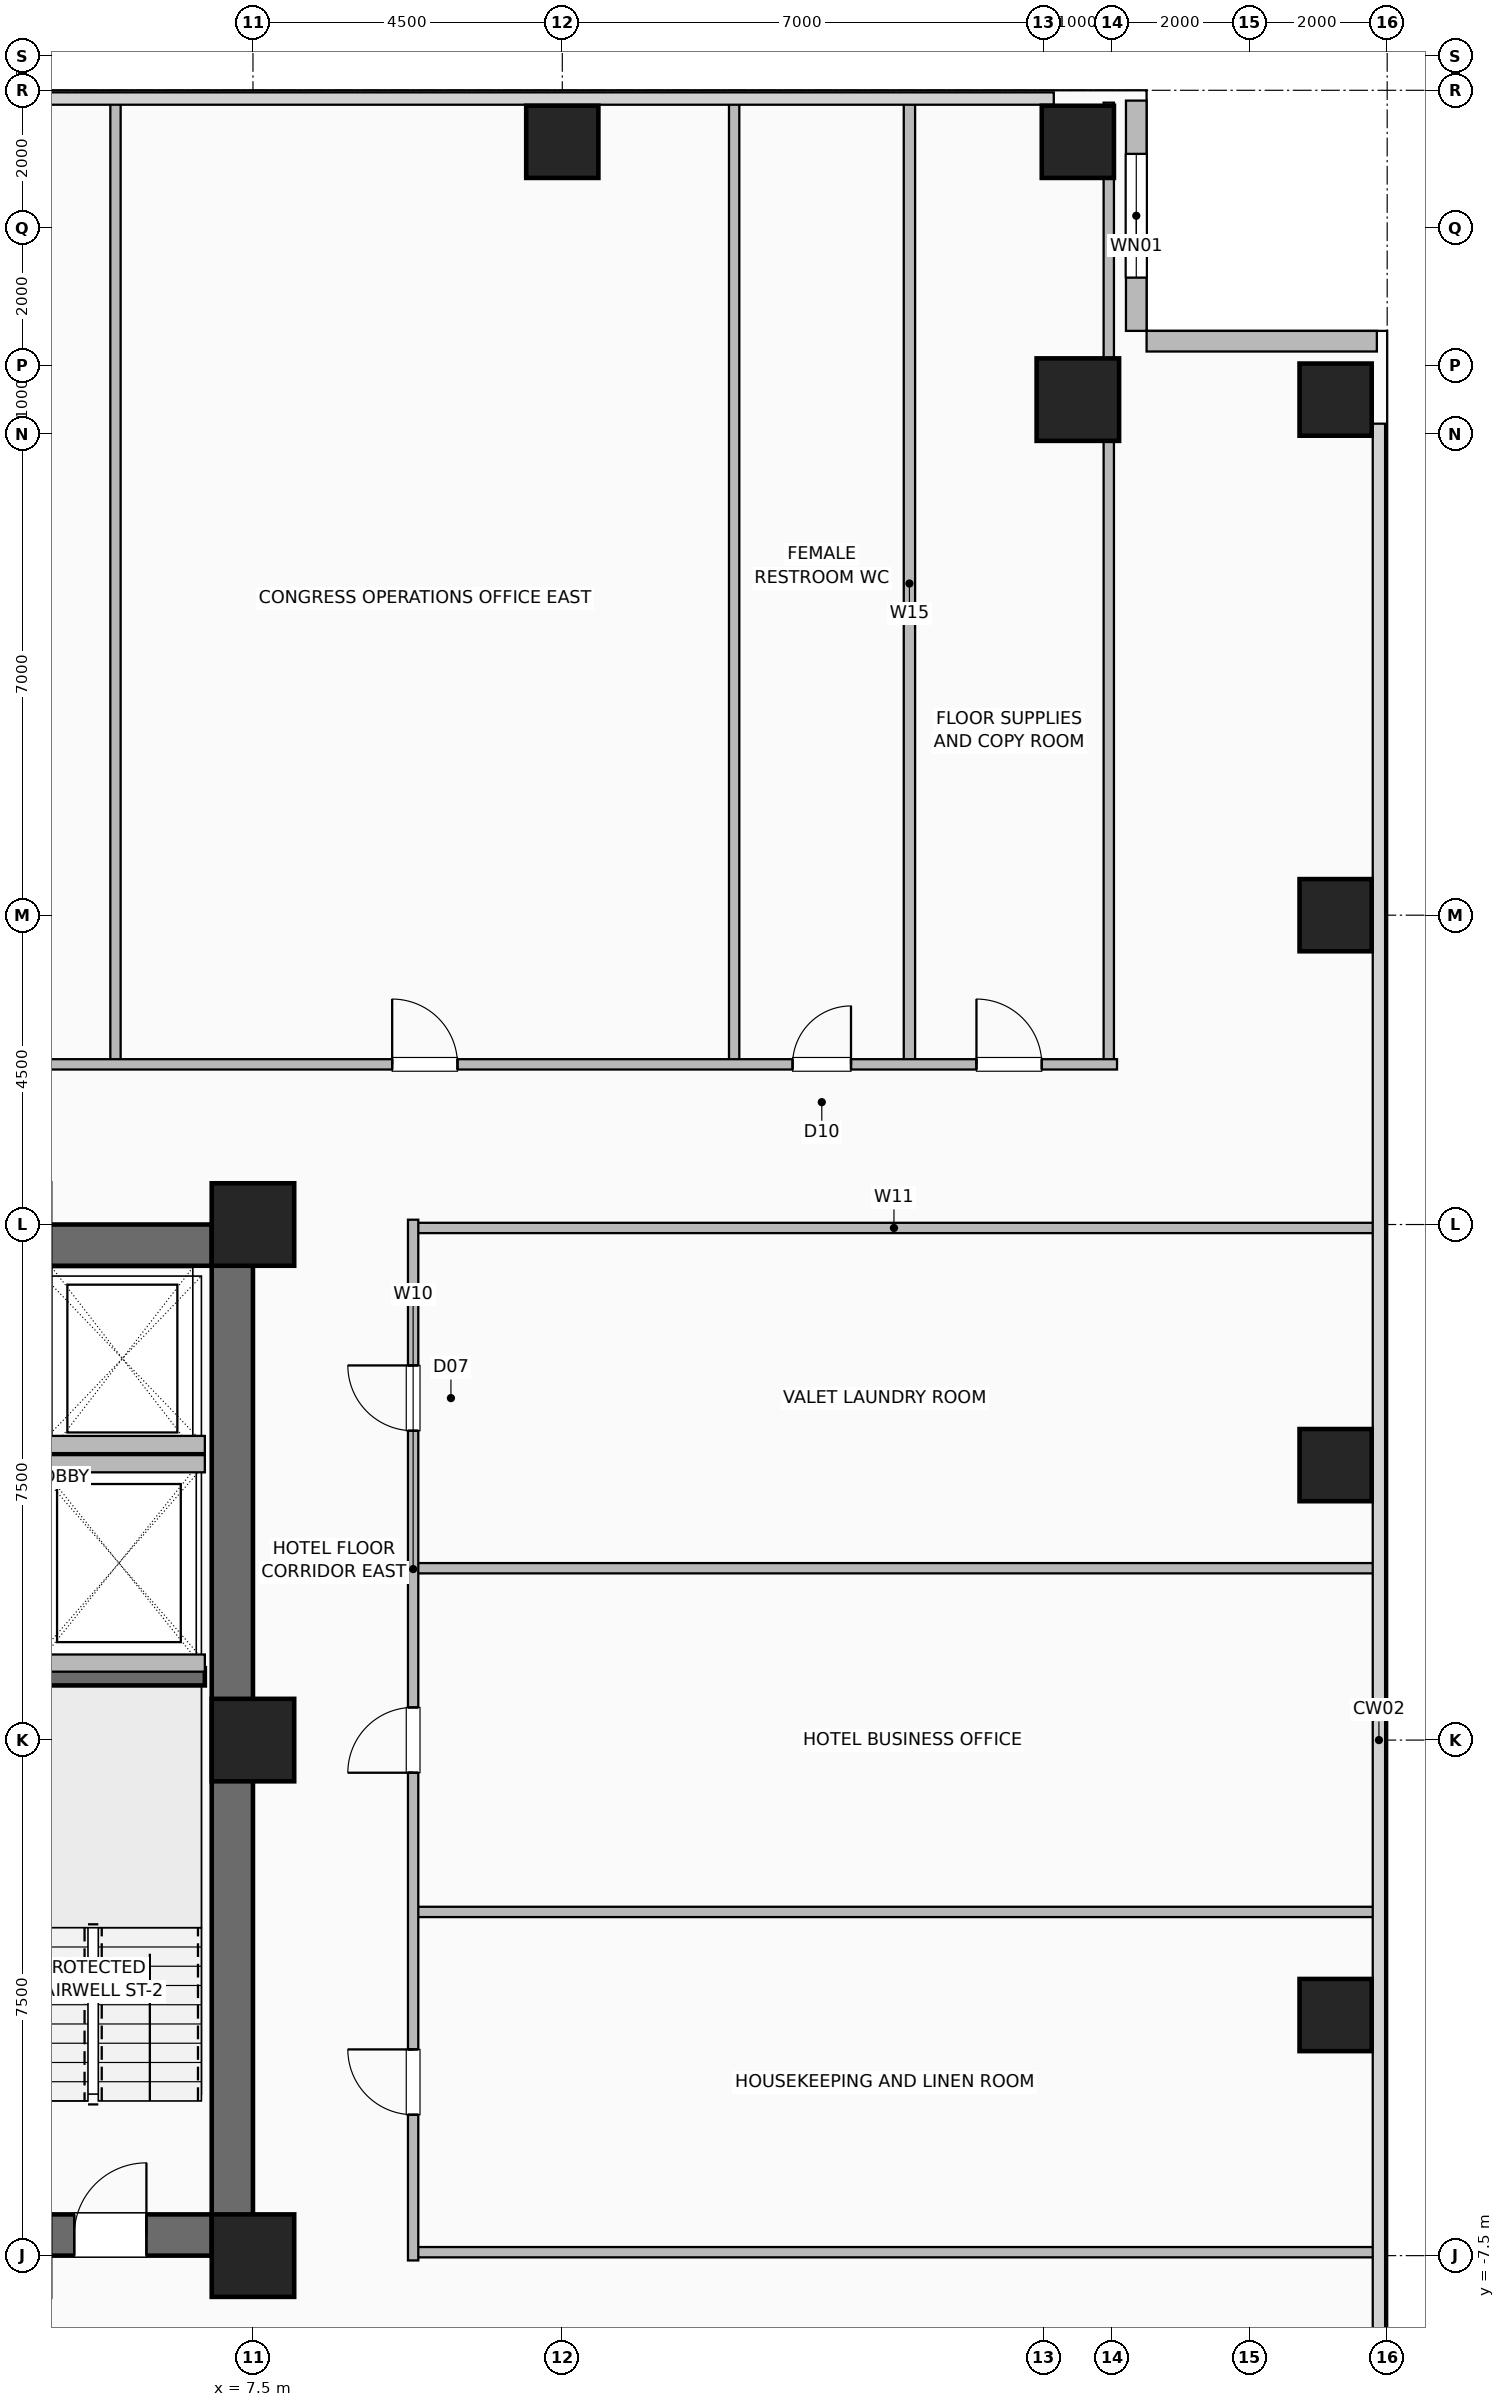
"""IFC4 building model, lengths in metres.
Left out: names, types, materials, properties, quantities, classifications, styles, units other than length and angle.
Written with IfcOpenShell. Run it as: python <this file> out.ifc"""

import sys

from ifc_helpers import new_model, si_unit, direction, frame, frame_2d, origin, origin_2d, place, context, subcontext, project, spatial, rectangle, hollow_rectangle, extrude, element, fill, save


model = new_model("IFC4")
c1 = context("Model", 3, precision=1e-05, world=origin(), true_north=direction((0.0, 1.0)))
c2 = subcontext(c1, "Body", "Model", "MODEL_VIEW")
j1 = project(units=[si_unit("LENGTHUNIT", "METRE"), si_unit("PLANEANGLEUNIT", "RADIAN")], contexts=[c1])
p1 = place(None, origin())
s1 = spatial("IfcSite", under=j1, at=p1, CompositionType="ELEMENT")
p2 = place(p1, origin())
s2 = spatial("IfcBuilding", under=s1, at=p2, CompositionType="ELEMENT")
p3 = place(p2, frame((0.0, 0.0, 41.0)))
s3 = spatial("IfcBuildingStorey", under=s2, at=p3, CompositionType="ELEMENT", Elevation=41.0)
for number, where, z_axis, x_axis in (
    (1, (7.5, -7.5, 0.0), (0.0, 0.0, 1.0), (1.0, 0.0, 0.0)),
    (2, (7.5, 0.0, 0.0), (0.0, 0.0, 1.0), (1.0, 0.0, 0.0)),
    (3, (7.5, 7.5, 0.0), (0.0, 0.0, 1.0), (1.0, 0.0, 0.0)),
):
    element("IfcColumn", number, at=place(p3, frame(where, z_axis=z_axis, x_axis=x_axis)), inside=s3, PredefinedType="COLUMN", context=c2, shape_type="SweptSolid", body=[
        extrude(hollow_rectangle(XDim=1.2, YDim=1.2, WallThickness=0.055, at=origin_2d()), origin(), (0.0, 0.0, 1.0), 3.5),
    ])
for number, where, z_axis, x_axis in (
    (4, (23.25, -4.0, 0.0), (0.0, 0.0, 1.0), (1.0, 0.0, 0.0)),
    (5, (23.25, 4.0, 0.0), (0.0, 0.0, 1.0), (1.0, 0.0, 0.0)),
    (6, (12.0, 23.25, 0.0), (0.0, 0.0, 1.0), (1.0, 0.0, 0.0)),
    (7, (23.25, 12.0, 0.0), (0.0, 0.0, 1.0), (1.0, 0.0, 0.0)),
    (8, (19.5, 23.25, 0.0), (0.0, 0.0, 1.0), (1.0, 0.0, 0.0)),
    (9, (23.25, 19.5, 0.0), (0.0, 0.0, 1.0), (1.0, 0.0, 0.0)),
):
    element("IfcColumn", number, at=place(p3, frame(where, z_axis=z_axis, x_axis=x_axis)), inside=s3, PredefinedType="COLUMN", context=c2, shape_type="SweptSolid", body=[
        extrude(hollow_rectangle(XDim=1.05, YDim=1.05, WallThickness=0.05, at=origin_2d()), origin(), (0.0, 0.0, 1.0), 3.5),
    ])
p4 = place(p3, frame((19.5, 19.5, 0.0), z_axis=(0.0, 0.0, 1.0), x_axis=(1.0, 0.0, 0.0)))
e10 = element("IfcColumn", 10, at=p4, inside=s3, PredefinedType="COLUMN", context=c2, shape_type="SweptSolid", body=[
    extrude(hollow_rectangle(XDim=1.2, YDim=1.2, WallThickness=0.055, at=origin_2d()), origin(), (0.0, 0.0, 1.0), 3.5),
])
p5 = place(p3, frame((20.35, 23.85, 0.0), z_axis=(0.0, 0.0, 1.0), x_axis=(0.0, -1.0, 0.0)))
e11 = element("IfcWall", 11, at=p5, inside=s3, PredefinedType="SOLIDWALL", context=c2, shape_type="SweptSolid", body=[
    extrude(rectangle(XDim=3.35, YDim=0.3, at=frame_2d((1.675, 0.0))), origin(), (0.0, 0.0, 1.0), 3.25),
])
p6 = place(p5, frame((0.775, 0.0, 0.9)))
e12 = element("IfcOpeningElement", 12, at=p6, cuts=e11, PredefinedType="OPENING", context=c2, shape_type="SweptSolid", body=[
    extrude(rectangle(XDim=1.8, YDim=1.8, at=frame_2d((0.9, 0.9))), frame((0.0, 0.16, 0.0), z_axis=(0.0, -1.0, 0.0), x_axis=(1.0, 0.0, 0.0)), (0.0, 0.0, 1.0), 0.32),
])
p7 = place(p3, frame((23.85, 20.35, 0.0), z_axis=(0.0, 0.0, 1.0), x_axis=(-1.0, 0.0, 0.0)))
e13 = element("IfcWall", 13, at=p7, inside=s3, PredefinedType="SOLIDWALL", context=c2, shape_type="SweptSolid", body=[
    extrude(rectangle(XDim=3.35, YDim=0.3, at=frame_2d((1.675, 0.0))), origin(), (0.0, 0.0, 1.0), 3.25),
])
p8 = place(p3, frame((-7.5, -7.2, 0.0), z_axis=(0.0, 0.0, 1.0), x_axis=(1.0, 0.0, 0.0)))
e14 = element("IfcWall", 14, at=p8, inside=s3, PredefinedType="SHEAR", context=c2, shape_type="SweptSolid", body=[
    extrude(rectangle(XDim=15.0, YDim=0.6, at=frame_2d((7.5, 0.0))), origin(), (0.0, 0.0, 1.0), 3.25),
])
p9 = place(p8, frame((1.55, 0.0, 0.0)))
e15 = element("IfcOpeningElement", 15, at=p9, cuts=e14, PredefinedType="OPENING", context=c2, shape_type="SweptSolid", body=[
    extrude(rectangle(XDim=1.05, YDim=2.08, at=frame_2d((0.525, 1.04))), frame((0.0, 0.31, 0.0), z_axis=(0.0, -1.0, 0.0), x_axis=(1.0, 0.0, 0.0)), (0.0, 0.0, 1.0), 0.62),
])
p10 = place(p8, frame((12.4, 0.0, 0.0)))
e16 = element("IfcOpeningElement", 16, at=p10, cuts=e14, PredefinedType="OPENING", context=c2, shape_type="SweptSolid", body=[
    extrude(rectangle(XDim=1.05, YDim=2.08, at=frame_2d((0.525, 1.04))), frame((0.0, 0.31, 0.0), z_axis=(0.0, -1.0, 0.0), x_axis=(1.0, 0.0, 0.0)), (0.0, 0.0, 1.0), 0.62),
])
p11 = place(p8, frame((4.64, 0.0, 0.0)))
e17 = element("IfcOpeningElement", 17, at=p11, cuts=e14, PredefinedType="OPENING", context=c2, shape_type="SweptSolid", body=[
    extrude(rectangle(XDim=1.1, YDim=2.2, at=frame_2d((0.55, 1.1))), frame((0.0, 0.31, 0.0), z_axis=(0.0, -1.0, 0.0), x_axis=(1.0, 0.0, 0.0)), (0.0, 0.0, 1.0), 0.62),
])
p12 = place(p8, frame((6.52, 0.0, 0.0)))
e18 = element("IfcOpeningElement", 18, at=p12, cuts=e14, PredefinedType="OPENING", context=c2, shape_type="SweptSolid", body=[
    extrude(rectangle(XDim=1.1, YDim=2.2, at=frame_2d((0.55, 1.1))), frame((0.0, 0.31, 0.0), z_axis=(0.0, -1.0, 0.0), x_axis=(1.0, 0.0, 0.0)), (0.0, 0.0, 1.0), 0.62),
])
p13 = place(p8, frame((8.4, 0.0, 0.0)))
e19 = element("IfcOpeningElement", 19, at=p13, cuts=e14, PredefinedType="OPENING", context=c2, shape_type="SweptSolid", body=[
    extrude(rectangle(XDim=1.1, YDim=2.2, at=frame_2d((0.55, 1.1))), frame((0.0, 0.31, 0.0), z_axis=(0.0, -1.0, 0.0), x_axis=(1.0, 0.0, 0.0)), (0.0, 0.0, 1.0), 0.62),
])
for number, where, z_axis, x_axis in (
    (20, (-7.5, 7.2, 0.0), (0.0, 0.0, 1.0), (1.0, 0.0, 0.0)),
    (21, (7.2, -7.5, 0.0), (0.0, 0.0, 1.0), (0.0, 1.0, 0.0)),
):
    element("IfcWall", number, at=place(p3, frame(where, z_axis=z_axis, x_axis=x_axis)), inside=s3, PredefinedType="SHEAR", context=c2, shape_type="SweptSolid", body=[
        extrude(rectangle(XDim=15.0, YDim=0.6, at=frame_2d((7.5, 0.0))), origin(), (0.0, 0.0, 1.0), 3.25),
    ])
p14 = place(p3, frame((3.47, 0.92, 0.0), z_axis=(0.0, 0.0, 1.0), x_axis=(1.0, 0.0, 0.0)))
e22 = element("IfcWall", 22, at=p14, inside=s3, PredefinedType="SHEAR", context=c2, shape_type="SweptSolid", body=[
    extrude(rectangle(XDim=3.33, YDim=0.25, at=frame_2d((1.665, 0.0))), origin(), (0.0, 0.0, 1.0), 3.25),
])
p15 = place(p3, frame((4.38, 4.3, 0.0), z_axis=(0.0, 0.0, 1.0), x_axis=(1.0, 0.0, 0.0)))
e23 = element("IfcWall", 23, at=p15, inside=s3, PredefinedType="SHEAR", context=c2, shape_type="SweptSolid", body=[
    extrude(rectangle(XDim=2.42, YDim=0.25, at=frame_2d((1.21, 0.0))), origin(), (0.0, 0.0, 1.0), 3.25),
])
for number, where, z_axis, x_axis in (
    (24, (4.28, 1.12, 0.0), (0.0, 0.0, 1.0), (1.0, 0.0, 0.0)),
    (25, (4.28, 4.02, 0.0), (0.0, 0.0, 1.0), (1.0, 0.0, 0.0)),
):
    element("IfcWall", number, at=place(p3, frame(where, z_axis=z_axis, x_axis=x_axis)), inside=s3, PredefinedType="SHEAR", context=c2, shape_type="SweptSolid", body=[
        extrude(rectangle(XDim=2.52, YDim=0.25, at=frame_2d((1.26, 0.0))), origin(), (0.0, 0.0, 1.0), 3.25),
    ])
p16 = place(p3, frame((17.05, 9.83, 0.0), z_axis=(0.0, 0.0, 1.0), x_axis=(0.0, 1.0, 0.0)))
e26 = element("IfcWall", 26, at=p16, inside=s3, PredefinedType="PLUMBINGWALL", context=c2, shape_type="SweptSolid", body=[
    extrude(rectangle(XDim=13.99, YDim=0.165, at=frame_2d((6.995, 0.0))), origin(), (0.0, 0.0, 1.0), 3.25),
])
for number, where, z_axis, x_axis in (
    (27, (5.5, 9.83, 0.0), (0.0, 0.0, 1.0), (0.0, 1.0, 0.0)),
    (28, (14.5, 9.83, 0.0), (0.0, 0.0, 1.0), (0.0, 1.0, 0.0)),
    (29, (19.95, 9.83, 0.0), (0.0, 0.0, 1.0), (0.0, 1.0, 0.0)),
):
    element("IfcWall", number, at=place(p3, frame(where, z_axis=z_axis, x_axis=x_axis)), inside=s3, PredefinedType="PARTITIONING", context=c2, shape_type="SweptSolid", body=[
        extrude(rectangle(XDim=13.99, YDim=0.15, at=frame_2d((6.995, 0.0))), origin(), (0.0, 0.0, 1.0), 3.25),
    ])
p17 = place(p3, frame((-20.07, 9.83, 0.0), z_axis=(0.0, 0.0, 1.0), x_axis=(1.0, 0.0, 0.0)))
e30 = element("IfcWall", 30, at=p17, inside=s3, PredefinedType="PARTITIONING", context=c2, shape_type="SweptSolid", body=[
    extrude(rectangle(XDim=40.14, YDim=0.15, at=frame_2d((20.07, 0.0))), origin(), (0.0, 0.0, 1.0), 3.25),
])
p18 = place(p17, frame((6.62, 0.0, 0.0)))
e31 = element("IfcOpeningElement", 31, at=p18, cuts=e30, PredefinedType="OPENING", context=c2, shape_type="SweptSolid", body=[
    extrude(rectangle(XDim=0.95, YDim=2.06, at=frame_2d((0.475, 1.03))), frame((0.0, 0.085, 0.0), z_axis=(0.0, -1.0, 0.0), x_axis=(1.0, 0.0, 0.0)), (0.0, 0.0, 1.0), 0.17),
])
p19 = place(p17, frame((18.92, 0.0, 0.0)))
e32 = element("IfcOpeningElement", 32, at=p19, cuts=e30, PredefinedType="OPENING", context=c2, shape_type="SweptSolid", body=[
    extrude(rectangle(XDim=1.8, YDim=2.08, at=frame_2d((0.9, 1.04))), frame((0.0, 0.085, 0.0), z_axis=(0.0, -1.0, 0.0), x_axis=(1.0, 0.0, 0.0)), (0.0, 0.0, 1.0), 0.17),
])
p20 = place(p17, frame((29.595, 0.0, 0.0)))
e33 = element("IfcOpeningElement", 33, at=p20, cuts=e30, PredefinedType="OPENING", context=c2, shape_type="SweptSolid", body=[
    extrude(rectangle(XDim=0.95, YDim=2.06, at=frame_2d((0.475, 1.03))), frame((0.0, 0.085, 0.0), z_axis=(0.0, -1.0, 0.0), x_axis=(1.0, 0.0, 0.0)), (0.0, 0.0, 1.0), 0.17),
])
p21 = place(p17, frame((35.42, 0.0, 0.0)))
e34 = element("IfcOpeningElement", 34, at=p21, cuts=e30, PredefinedType="OPENING", context=c2, shape_type="SweptSolid", body=[
    extrude(rectangle(XDim=0.85, YDim=2.05, at=frame_2d((0.425, 1.025))), frame((0.0, 0.085, 0.0), z_axis=(0.0, -1.0, 0.0), x_axis=(1.0, 0.0, 0.0)), (0.0, 0.0, 1.0), 0.17),
])
p22 = place(p17, frame((38.095, 0.0, 0.0)))
e35 = element("IfcOpeningElement", 35, at=p22, cuts=e30, PredefinedType="OPENING", context=c2, shape_type="SweptSolid", body=[
    extrude(rectangle(XDim=0.95, YDim=2.06, at=frame_2d((0.475, 1.03))), frame((0.0, 0.085, 0.0), z_axis=(0.0, -1.0, 0.0), x_axis=(1.0, 0.0, 0.0)), (0.0, 0.0, 1.0), 0.17),
])
for number, where, z_axis, x_axis in (
    (36, (9.83, -7.45, 0.0), (0.0, 0.0, 1.0), (1.0, 0.0, 0.0)),
    (37, (9.83, -2.5, 0.0), (0.0, 0.0, 1.0), (1.0, 0.0, 0.0)),
    (38, (9.83, 2.5, 0.0), (0.0, 0.0, 1.0), (1.0, 0.0, 0.0)),
    (39, (9.83, 7.45, 0.0), (0.0, 0.0, 1.0), (1.0, 0.0, 0.0)),
):
    element("IfcWall", number, at=place(p3, frame(where, z_axis=z_axis, x_axis=x_axis)), inside=s3, PredefinedType="PARTITIONING", context=c2, shape_type="SweptSolid", body=[
        extrude(rectangle(XDim=13.99, YDim=0.15, at=frame_2d((6.995, 0.0))), origin(), (0.0, 0.0, 1.0), 3.25),
    ])
p23 = place(p3, frame((9.83, -7.57, 0.0), z_axis=(0.0, 0.0, 1.0), x_axis=(0.0, 1.0, 0.0)))
e40 = element("IfcWall", 40, at=p23, inside=s3, PredefinedType="PARTITIONING", context=c2, shape_type="SweptSolid", body=[
    extrude(rectangle(XDim=15.14, YDim=0.15, at=frame_2d((7.57, 0.0))), origin(), (0.0, 0.0, 1.0), 3.25),
])
p24 = place(p23, frame((2.12, 0.0, 0.0)))
e41 = element("IfcOpeningElement", 41, at=p24, cuts=e40, PredefinedType="OPENING", context=c2, shape_type="SweptSolid", body=[
    extrude(rectangle(XDim=0.95, YDim=2.06, at=frame_2d((0.475, 1.03))), frame((0.0, 0.085, 0.0), z_axis=(0.0, -1.0, 0.0), x_axis=(1.0, 0.0, 0.0)), (0.0, 0.0, 1.0), 0.17),
])
p25 = place(p23, frame((7.095, 0.0, 0.0)))
e42 = element("IfcOpeningElement", 42, at=p25, cuts=e40, PredefinedType="OPENING", context=c2, shape_type="SweptSolid", body=[
    extrude(rectangle(XDim=0.95, YDim=2.06, at=frame_2d((0.475, 1.03))), frame((0.0, 0.085, 0.0), z_axis=(0.0, -1.0, 0.0), x_axis=(1.0, 0.0, 0.0)), (0.0, 0.0, 1.0), 0.17),
])
p26 = place(p23, frame((12.07, 0.0, 0.0)))
e43 = element("IfcOpeningElement", 43, at=p26, cuts=e40, PredefinedType="OPENING", context=c2, shape_type="SweptSolid", body=[
    extrude(rectangle(XDim=0.95, YDim=2.06, at=frame_2d((0.475, 1.03))), frame((0.0, 0.085, 0.0), z_axis=(0.0, -1.0, 0.0), x_axis=(1.0, 0.0, 0.0)), (0.0, 0.0, 1.0), 0.17),
])
p27 = place(p6, origin())
e44 = element("IfcWindow", 44, at=p27, inside=s3, PartitioningType="SINGLE_PANEL", PredefinedType="WINDOW", context=c2, shape_type="SweptSolid", body=[
    extrude(rectangle(XDim=1.8, YDim=1.8, at=frame_2d((0.9, 0.9))), frame((0.0, 0.03, 0.0), z_axis=(0.0, -1.0, 0.0), x_axis=(1.0, 0.0, 0.0)), (0.0, 0.0, 1.0), 0.06),
])
fill(e12, e44)
p28 = place(p10, origin())
e45 = element("IfcDoor", 45, at=p28, inside=s3, OperationType="SINGLE_SWING_RIGHT", PredefinedType="DOOR", context=c2, shape_type="SweptSolid", body=[
    extrude(rectangle(XDim=1.05, YDim=2.08, at=frame_2d((0.525, 1.04))), frame((0.0, 0.025, 0.0), z_axis=(0.0, -1.0, 0.0), x_axis=(1.0, 0.0, 0.0)), (0.0, 0.0, 1.0), 0.05),
])
fill(e16, e45)
p29 = place(p20, origin())
e46 = element("IfcDoor", 46, at=p29, inside=s3, OperationType="SINGLE_SWING_LEFT", PredefinedType="DOOR", context=c2, shape_type="SweptSolid", body=[
    extrude(rectangle(XDim=0.95, YDim=2.06, at=frame_2d((0.475, 1.03))), frame((0.0, 0.025, 0.0), z_axis=(0.0, -1.0, 0.0), x_axis=(1.0, 0.0, 0.0)), (0.0, 0.0, 1.0), 0.05),
])
fill(e33, e46)
p30 = place(p21, origin())
e47 = element("IfcDoor", 47, at=p30, inside=s3, OperationType="SINGLE_SWING_RIGHT", PredefinedType="DOOR", context=c2, shape_type="SweptSolid", body=[
    extrude(rectangle(XDim=0.85, YDim=2.05, at=frame_2d((0.425, 1.025))), frame((0.0, 0.025, 0.0), z_axis=(0.0, -1.0, 0.0), x_axis=(1.0, 0.0, 0.0)), (0.0, 0.0, 1.0), 0.05),
])
fill(e34, e47)
p31 = place(p22, origin())
e48 = element("IfcDoor", 48, at=p31, inside=s3, OperationType="SINGLE_SWING_LEFT", PredefinedType="DOOR", context=c2, shape_type="SweptSolid", body=[
    extrude(rectangle(XDim=0.95, YDim=2.06, at=frame_2d((0.475, 1.03))), frame((0.0, 0.025, 0.0), z_axis=(0.0, -1.0, 0.0), x_axis=(1.0, 0.0, 0.0)), (0.0, 0.0, 1.0), 0.05),
])
fill(e35, e48)
p32 = place(p24, origin())
e49 = element("IfcDoor", 49, at=p32, inside=s3, OperationType="SINGLE_SWING_RIGHT", PredefinedType="DOOR", context=c2, shape_type="SweptSolid", body=[
    extrude(rectangle(XDim=0.95, YDim=2.06, at=frame_2d((0.475, 1.03))), frame((0.0, 0.025, 0.0), z_axis=(0.0, -1.0, 0.0), x_axis=(1.0, 0.0, 0.0)), (0.0, 0.0, 1.0), 0.05),
])
fill(e41, e49)
p33 = place(p25, origin())
e50 = element("IfcDoor", 50, at=p33, inside=s3, OperationType="SINGLE_SWING_LEFT", PredefinedType="DOOR", context=c2, shape_type="SweptSolid", body=[
    extrude(rectangle(XDim=0.95, YDim=2.06, at=frame_2d((0.475, 1.03))), frame((0.0, 0.025, 0.0), z_axis=(0.0, -1.0, 0.0), x_axis=(1.0, 0.0, 0.0)), (0.0, 0.0, 1.0), 0.05),
])
fill(e42, e50)
p34 = place(p26, origin())
e51 = element("IfcDoor", 51, at=p34, inside=s3, OperationType="SINGLE_SWING_RIGHT", PredefinedType="DOOR", context=c2, shape_type="SweptSolid", body=[
    extrude(rectangle(XDim=0.95, YDim=2.06, at=frame_2d((0.475, 1.03))), frame((0.0, 0.025, 0.0), z_axis=(0.0, -1.0, 0.0), x_axis=(1.0, 0.0, 0.0)), (0.0, 0.0, 1.0), 0.05),
])
fill(e43, e51)
save(model, sys.argv[1])
